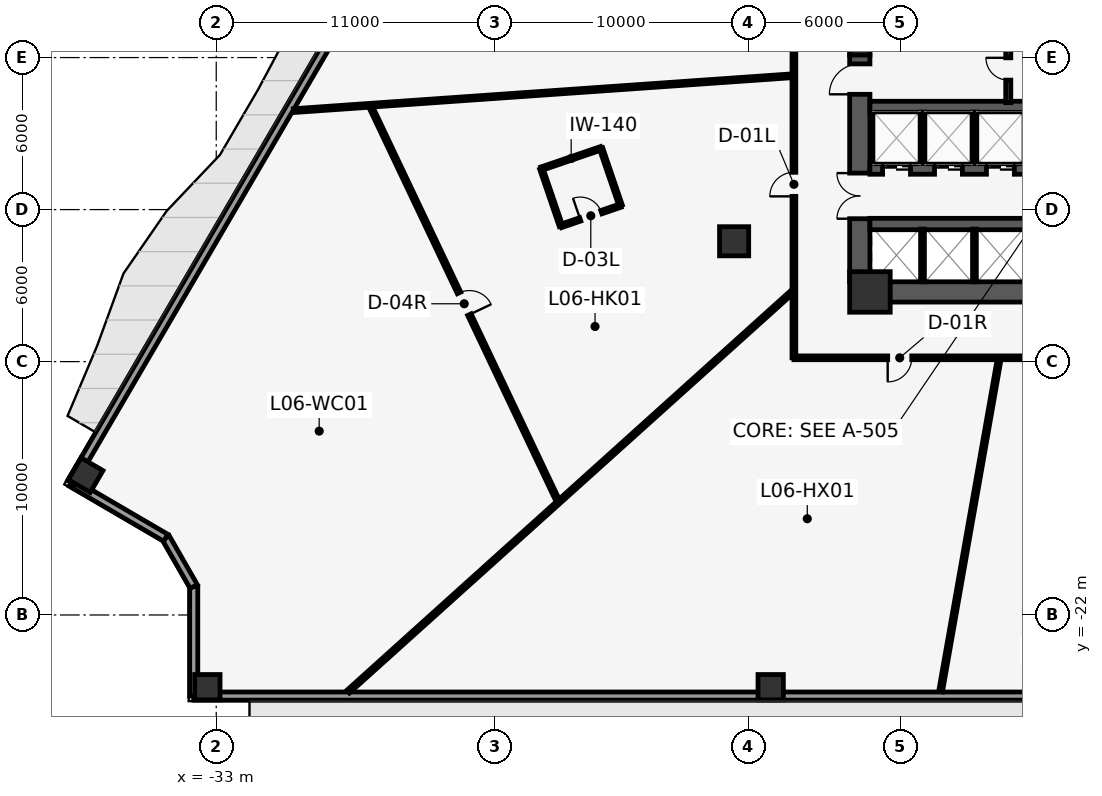
"""IFC4 building model, lengths in metres.
Left out: names, types, materials, properties, quantities, classifications, styles, units other than length and angle.
Written with IfcOpenShell. Run it as: python <this file> out.ifc"""

import sys

from ifc_helpers import new_model, si_unit, direction, frame, frame_2d, origin, origin_2d, place, context, subcontext, project, spatial, rectangle, hollow_rectangle, extrude, element, fill, save


model = new_model("IFC4")
c1 = context("Model", 3, precision=1e-05, world=origin(), true_north=direction((0.0, 1.0)))
c2 = subcontext(c1, "Body", "Model", "MODEL_VIEW")
j1 = project(units=[si_unit("LENGTHUNIT", "METRE"), si_unit("PLANEANGLEUNIT", "RADIAN")], contexts=[c1])
p1 = place(None, origin())
s1 = spatial("IfcSite", under=j1, at=p1, CompositionType="ELEMENT")
p2 = place(p1, origin())
s2 = spatial("IfcBuilding", under=s1, at=p2, CompositionType="ELEMENT")
p3 = place(p2, frame((0.0, 0.0, 34.4)))
s3 = spatial("IfcBuildingStorey", under=s2, at=p3, CompositionType="ELEMENT", Elevation=34.4)
p4 = place(p3, frame((-7.6, 0.1, 0.0), z_axis=(0.0, 0.0, 1.0), x_axis=(0.0, 1.0, 0.0)))
e1 = element("IfcWall", 1, at=p4, inside=s3, PredefinedType="SHEAR", context=c2, shape_type="SweptSolid", body=[
    extrude(rectangle(XDim=9.05, YDim=0.8, at=frame_2d((4.525, 0.0))), origin(), (0.0, 0.0, 1.0), 3.75),
])
p5 = place(p3, frame((-7.6, -8.85, 0.0), z_axis=(0.0, 0.0, 1.0), x_axis=(0.0, 1.0, 0.0)))
e2 = element("IfcWall", 2, at=p5, inside=s3, PredefinedType="SHEAR", context=c2, shape_type="SweptSolid", body=[
    extrude(rectangle(XDim=8.95, YDim=0.8, at=frame_2d((4.475, 0.0))), origin(), (0.0, 0.0, 1.0), 3.75),
])
p6 = place(p5, frame((2.49, 0.0, 0.0)))
e3 = element("IfcOpeningElement", 3, at=p6, cuts=e2, PredefinedType="OPENING", context=c2, shape_type="SweptSolid", body=[
    extrude(rectangle(XDim=1.8, YDim=2.2, at=frame_2d((0.9, 1.1))), frame((0.0, 0.41, 0.0), z_axis=(0.0, -1.0, 0.0), x_axis=(1.0, 0.0, 0.0)), (0.0, 0.0, 1.0), 0.82),
])
p7 = place(p5, frame((7.4, 0.0, 0.0)))
e4 = element("IfcOpeningElement", 4, at=p7, cuts=e2, PredefinedType="OPENING", context=c2, shape_type="SweptSolid", body=[
    extrude(rectangle(XDim=1.2, YDim=2.15, at=frame_2d((0.6, 1.075))), frame((0.0, 0.41, 0.0), z_axis=(0.0, -1.0, 0.0), x_axis=(1.0, 0.0, 0.0)), (0.0, 0.0, 1.0), 0.82),
])
p8 = place(p3, frame((-7.6, -9.25, 0.0), z_axis=(0.0, 0.0, 1.0), x_axis=(1.0, 0.0, 0.0)))
e5 = element("IfcWall", 5, at=p8, inside=s3, PredefinedType="SHEAR", context=c2, shape_type="SweptSolid", body=[
    extrude(rectangle(XDim=15.2, YDim=0.8, at=frame_2d((7.6, 0.0))), origin(), (0.0, 0.0, 1.0), 3.75),
])
p9 = place(p3, frame((-7.2, -1.95, 0.0), z_axis=(0.0, 0.0, 1.0), x_axis=(1.0, 0.0, 0.0)))
e6 = element("IfcWall", 6, at=p9, inside=s3, PredefinedType="SHEAR", context=c2, shape_type="SweptSolid", body=[
    extrude(rectangle(XDim=14.4, YDim=0.45, at=frame_2d((7.2, 0.0))), origin(), (0.0, 0.0, 1.0), 3.75),
])
p10 = place(p3, frame((-7.2, -4.38, 0.0), z_axis=(0.0, 0.0, 1.0), x_axis=(1.0, 0.0, 0.0)))
e7 = element("IfcWall", 7, at=p10, inside=s3, PredefinedType="SHEAR", context=c2, shape_type="SweptSolid", body=[
    extrude(rectangle(XDim=14.4, YDim=0.45, at=frame_2d((7.2, 0.0))), origin(), (0.0, 0.0, 1.0), 3.75),
])
p11 = place(p10, frame((0.5, 0.0, 0.0)))
e8 = element("IfcOpeningElement", 8, at=p11, cuts=e7, PredefinedType="OPENING", context=c2, shape_type="SweptSolid", body=[
    extrude(rectangle(XDim=1.1, YDim=2.2, at=frame_2d((0.55, 1.1))), frame((0.0, 0.235, 0.0), z_axis=(0.0, -1.0, 0.0), x_axis=(1.0, 0.0, 0.0)), (0.0, 0.0, 1.0), 0.47),
])
p12 = place(p10, frame((2.55, 0.0, 0.0)))
e9 = element("IfcOpeningElement", 9, at=p12, cuts=e7, PredefinedType="OPENING", context=c2, shape_type="SweptSolid", body=[
    extrude(rectangle(XDim=1.1, YDim=2.2, at=frame_2d((0.55, 1.1))), frame((0.0, 0.235, 0.0), z_axis=(0.0, -1.0, 0.0), x_axis=(1.0, 0.0, 0.0)), (0.0, 0.0, 1.0), 0.47),
])
p13 = place(p10, frame((4.6, 0.0, 0.0)))
e10 = element("IfcOpeningElement", 10, at=p13, cuts=e7, PredefinedType="OPENING", context=c2, shape_type="SweptSolid", body=[
    extrude(rectangle(XDim=1.1, YDim=2.2, at=frame_2d((0.55, 1.1))), frame((0.0, 0.235, 0.0), z_axis=(0.0, -1.0, 0.0), x_axis=(1.0, 0.0, 0.0)), (0.0, 0.0, 1.0), 0.47),
])
p14 = place(p10, frame((6.3, 0.0, 0.0)))
e11 = element("IfcOpeningElement", 11, at=p14, cuts=e7, PredefinedType="OPENING", context=c2, shape_type="SweptSolid", body=[
    extrude(rectangle(XDim=1.1, YDim=2.2, at=frame_2d((0.55, 1.1))), frame((0.0, 0.235, 0.0), z_axis=(0.0, -1.0, 0.0), x_axis=(1.0, 0.0, 0.0)), (0.0, 0.0, 1.0), 0.47),
])
p15 = place(p3, frame((-7.2, -6.57, 0.0), z_axis=(0.0, 0.0, 1.0), x_axis=(1.0, 0.0, 0.0)))
e12 = element("IfcWall", 12, at=p15, inside=s3, PredefinedType="SHEAR", context=c2, shape_type="SweptSolid", body=[
    extrude(rectangle(XDim=14.4, YDim=0.45, at=frame_2d((7.2, 0.0))), origin(), (0.0, 0.0, 1.0), 3.75),
])
p16 = place(p15, frame((12.91, 0.0, 0.0)))
e13 = element("IfcOpeningElement", 13, at=p16, cuts=e12, PredefinedType="OPENING", context=c2, shape_type="SweptSolid", body=[
    extrude(rectangle(XDim=0.88, YDim=2.15, at=frame_2d((0.44, 1.075))), frame((0.0, 0.235, 0.0), z_axis=(0.0, -1.0, 0.0), x_axis=(1.0, 0.0, 0.0)), (0.0, 0.0, 1.0), 0.47),
])
p17 = place(p3, frame((-7.2, -9.25, 0.0), z_axis=(0.0, 0.0, 1.0), x_axis=(1.0, 0.0, 0.0)))
e14 = element("IfcColumn", 14, at=p17, inside=s3, PredefinedType="COLUMN", context=c2, shape_type="SweptSolid", body=[
    extrude(rectangle(XDim=1.6, YDim=1.6, at=origin_2d()), origin(), (0.0, 0.0, 1.0), 4.0),
])
p18 = place(p3, frame((-12.56, -7.25, 0.0), z_axis=(0.0, 0.0, 1.0), x_axis=(1.0, 0.0, 0.0)))
e15 = element("IfcColumn", 15, at=p18, inside=s3, PredefinedType="COLUMN", context=c2, shape_type="SweptSolid", body=[
    extrude(rectangle(XDim=1.15, YDim=1.15, at=origin_2d()), origin(), (0.0, 0.0, 1.0), 4.0),
])
for number, where, z_axis, x_axis in (
    (16, (-38.154, -16.481, 0.0), (0.0, 0.0, 1.0), (0.504, 0.863, 0.0)),
    (17, (-33.35, -24.85, 0.0), (0.0, 0.0, 1.0), (1.0, 0.0, 0.0)),
    (18, (-11.117, -24.85, 0.0), (0.0, 0.0, 1.0), (1.0, 0.0, 0.0)),
):
    element("IfcColumn", number, at=place(p3, frame(where, z_axis=z_axis, x_axis=x_axis)), inside=s3, PredefinedType="COLUMN", context=c2, shape_type="SweptSolid", body=[
        extrude(hollow_rectangle(XDim=1.0, YDim=1.0, WallThickness=0.06, at=origin_2d()), origin(), (0.0, 0.0, 1.0), 4.0),
    ])
p19 = place(p3, frame((33.888, -25.2, 0.0), z_axis=(0.0, 0.0, 1.0), x_axis=(-1.0, 0.0, 0.0)))
e19 = element("IfcWall", 19, at=p19, inside=s3, PredefinedType="STANDARD", context=c2, shape_type="SweptSolid", body=[
    extrude(rectangle(XDim=67.776, YDim=0.32, at=frame_2d((33.888, 0.0))), origin(), (0.0, 0.0, 1.0), 3.75),
])
p20 = place(p19, frame((33.388, 0.0, 0.0)))
e20 = element("IfcOpeningElement", 20, at=p20, cuts=e19, PredefinedType="OPENING", context=c2, shape_type="SweptSolid", body=[
    extrude(rectangle(XDim=1.0, YDim=2.15, at=frame_2d((0.5, 1.075))), frame((0.0, 0.17, 0.0), z_axis=(0.0, -1.0, 0.0), x_axis=(1.0, 0.0, 0.0)), (0.0, 0.0, 1.0), 0.34),
])
p21 = place(p3, frame((-33.888, -25.2, 0.0), z_axis=(0.0, 0.0, 1.0), x_axis=(0.0, 1.0, 0.0)))
e21 = element("IfcWall", 21, at=p21, inside=s3, PredefinedType="STANDARD", context=c2, shape_type="SweptSolid", body=[
    extrude(rectangle(XDim=4.324, YDim=0.32, at=frame_2d((2.162, 0.0))), origin(), (0.0, 0.0, 1.0), 3.75),
])
p22 = place(p3, frame((-33.888, -20.876, 0.0), z_axis=(0.0, 0.0, 1.0), x_axis=(-0.497881323344, 0.867245171717, 0.0)))
e22 = element("IfcWall", 22, at=p22, inside=s3, PredefinedType="STANDARD", context=c2, shape_type="SweptSolid", body=[
    extrude(rectangle(XDim=2.217, YDim=0.32, at=frame_2d((1.108, 0.0))), origin(), (0.0, 0.0, 1.0), 3.75),
])
p23 = place(p3, frame((-34.992, -18.954, 0.0), z_axis=(0.0, 0.0, 1.0), x_axis=(-0.863569936823, 0.504229079105, 0.0)))
e23 = element("IfcWall", 23, at=p23, inside=s3, PredefinedType="STANDARD", context=c2, shape_type="SweptSolid", body=[
    extrude(rectangle(XDim=4.324, YDim=0.32, at=frame_2d((2.162, 0.0))), origin(), (0.0, 0.0, 1.0), 3.75),
])
p24 = place(p3, frame((-38.726, -16.773, 0.0), z_axis=(0.0, 0.0, 1.0), x_axis=(0.504213113214, 0.863579258935, 0.0)))
e24 = element("IfcWall", 24, at=p24, inside=s3, PredefinedType="STANDARD", context=c2, shape_type="SweptSolid", body=[
    extrude(rectangle(XDim=67.041, YDim=0.32, at=frame_2d((33.521, 0.0))), origin(), (0.0, 0.0, 1.0), 3.75),
])
p25 = place(p24, frame((33.021, 0.0, 0.0)))
e25 = element("IfcOpeningElement", 25, at=p25, cuts=e24, PredefinedType="OPENING", context=c2, shape_type="SweptSolid", body=[
    extrude(rectangle(XDim=1.0, YDim=2.15, at=frame_2d((0.5, 1.075))), frame((0.0, 0.17, 0.0), z_axis=(0.0, -1.0, 0.0), x_axis=(1.0, 0.0, 0.0)), (0.0, 0.0, 1.0), 0.34),
])
for number, where, z_axis, x_axis in (
    (26, (-5.125, -4.18, 0.0), (0.0, 0.0, 1.0), (0.0, 1.0, 0.0)),
    (27, (-3.075, -4.18, 0.0), (0.0, 0.0, 1.0), (0.0, 1.0, 0.0)),
):
    element("IfcWall", number, at=place(p3, frame(where, z_axis=z_axis, x_axis=x_axis)), inside=s3, PredefinedType="PARTITIONING", context=c2, shape_type="SweptSolid", body=[
        extrude(rectangle(XDim=2.03, YDim=0.15, at=frame_2d((1.015, 0.0))), origin(), (0.0, 0.0, 1.0), 3.75),
    ])
for number, where, z_axis, x_axis in (
    (28, (-5.125, -8.85, 0.0), (0.0, 0.0, 1.0), (0.0, 1.0, 0.0)),
    (29, (-3.075, -8.85, 0.0), (0.0, 0.0, 1.0), (0.0, 1.0, 0.0)),
):
    element("IfcWall", number, at=place(p3, frame(where, z_axis=z_axis, x_axis=x_axis)), inside=s3, PredefinedType="PARTITIONING", context=c2, shape_type="SweptSolid", body=[
        extrude(rectangle(XDim=2.08, YDim=0.15, at=frame_2d((1.04, 0.0))), origin(), (0.0, 0.0, 1.0), 3.75),
    ])
p26 = place(p3, frame((-1.74, -1.78, 0.0), z_axis=(0.0, 0.0, 1.0), x_axis=(0.0, 1.0, 0.0)))
e30 = element("IfcWall", 30, at=p26, inside=s3, PredefinedType="PARTITIONING", context=c2, shape_type="SweptSolid", body=[
    extrude(rectangle(XDim=2.98, YDim=0.2, at=frame_2d((1.49, 0.0))), origin(), (0.0, 0.0, 1.0), 3.75),
])
p27 = place(p26, frame((0.89, 0.0, 0.0)))
e31 = element("IfcOpeningElement", 31, at=p27, cuts=e30, PredefinedType="OPENING", context=c2, shape_type="SweptSolid", body=[
    extrude(rectangle(XDim=0.88, YDim=2.15, at=frame_2d((0.44, 1.075))), frame((0.0, 0.11, 0.0), z_axis=(0.0, -1.0, 0.0), x_axis=(1.0, 0.0, 0.0)), (0.0, 0.0, 1.0), 0.22),
])
p28 = place(p3, frame((10.2, -11.85, 0.0), z_axis=(0.0, 0.0, 1.0), x_axis=(-1.0, 0.0, 0.0)))
e32 = element("IfcWall", 32, at=p28, inside=s3, PredefinedType="PARTITIONING", context=c2, shape_type="SweptSolid", body=[
    extrude(rectangle(XDim=20.4, YDim=0.15, at=frame_2d((10.2, 0.0))), origin(), (0.0, 0.0, 1.0), 3.75),
])
p29 = place(p28, frame((15.749, 0.0, 0.0)))
e33 = element("IfcOpeningElement", 33, at=p29, cuts=e32, PredefinedType="OPENING", context=c2, shape_type="SweptSolid", body=[
    extrude(rectangle(XDim=0.95, YDim=2.15, at=frame_2d((0.475, 1.075))), frame((0.0, 0.085, 0.0), z_axis=(0.0, -1.0, 0.0), x_axis=(1.0, 0.0, 0.0)), (0.0, 0.0, 1.0), 0.17),
])
p30 = place(p28, frame((7.604, 0.0, 0.0)))
e34 = element("IfcOpeningElement", 34, at=p30, cuts=e32, PredefinedType="OPENING", context=c2, shape_type="SweptSolid", body=[
    extrude(rectangle(XDim=0.95, YDim=2.15, at=frame_2d((0.475, 1.075))), frame((0.0, 0.085, 0.0), z_axis=(0.0, -1.0, 0.0), x_axis=(1.0, 0.0, 0.0)), (0.0, 0.0, 1.0), 0.17),
])
p31 = place(p3, frame((-10.2, -11.85, 0.0), z_axis=(0.0, 0.0, 1.0), x_axis=(0.0, 1.0, 0.0)))
e35 = element("IfcWall", 35, at=p31, inside=s3, PredefinedType="PARTITIONING", context=c2, shape_type="SweptSolid", body=[
    extrude(rectangle(XDim=24.0, YDim=0.15, at=frame_2d((12.0, 0.0))), origin(), (0.0, 0.0, 1.0), 3.75),
])
p32 = place(p31, frame((6.372, 0.0, 0.0)))
e36 = element("IfcOpeningElement", 36, at=p32, cuts=e35, PredefinedType="OPENING", context=c2, shape_type="SweptSolid", body=[
    extrude(rectangle(XDim=0.95, YDim=2.15, at=frame_2d((0.475, 1.075))), frame((0.0, 0.085, 0.0), z_axis=(0.0, -1.0, 0.0), x_axis=(1.0, 0.0, 0.0)), (0.0, 0.0, 1.0), 0.17),
])
p33 = place(p31, frame((14.489, 0.0, 0.0)))
e37 = element("IfcOpeningElement", 37, at=p33, cuts=e35, PredefinedType="OPENING", context=c2, shape_type="SweptSolid", body=[
    extrude(rectangle(XDim=0.95, YDim=2.15, at=frame_2d((0.475, 1.075))), frame((0.0, 0.085, 0.0), z_axis=(0.0, -1.0, 0.0), x_axis=(1.0, 0.0, 0.0)), (0.0, 0.0, 1.0), 0.17),
])
p34 = place(p3, frame((-10.305, -0.721, 0.0), z_axis=(0.0, 0.0, 1.0), x_axis=(-0.997564481565, -0.069750305525, 0.0)))
e38 = element("IfcWall", 38, at=p34, inside=s3, PredefinedType="PARTITIONING", context=c2, shape_type="SweptSolid", body=[
    extrude(rectangle(XDim=19.696, YDim=0.15, at=frame_2d((9.848, 0.0))), origin(), (0.0, 0.0, 1.0), 3.75),
])
p35 = place(p3, frame((-10.305, -9.279, 0.0), z_axis=(0.0, 0.0, 1.0), x_axis=(-0.743153814776, -0.669120622596, 0.0)))
e39 = element("IfcWall", 39, at=p35, inside=s3, PredefinedType="PARTITIONING", context=c2, shape_type="SweptSolid", body=[
    extrude(rectangle(XDim=23.532, YDim=0.15, at=frame_2d((11.766, 0.0))), origin(), (0.0, 0.0, 1.0), 3.75),
])
p36 = place(p3, frame((-2.108, -11.955, 0.0), z_axis=(0.0, 0.0, 1.0), x_axis=(-0.173657301911, -0.984806144118, 0.0)))
e40 = element("IfcWall", 40, at=p36, inside=s3, PredefinedType="PARTITIONING", context=c2, shape_type="SweptSolid", body=[
    extrude(rectangle(XDim=13.271, YDim=0.15, at=frame_2d((6.636, 0.0))), origin(), (0.0, 0.0, 1.0), 3.75),
])
p37 = place(p3, frame((-26.922, -1.908, 0.0), z_axis=(0.0, 0.0, 1.0), x_axis=(0.429066894507, -0.903272716314, 0.0)))
e41 = element("IfcWall", 41, at=p37, inside=s3, PredefinedType="PARTITIONING", context=c2, shape_type="SweptSolid", body=[
    extrude(rectangle(XDim=17.292, YDim=0.15, at=frame_2d((8.646, 0.0))), origin(), (0.0, 0.0, 1.0), 3.75),
])
p38 = place(p37, frame((8.171, 0.0, 0.0)))
e42 = element("IfcOpeningElement", 42, at=p38, cuts=e41, PredefinedType="OPENING", context=c2, shape_type="SweptSolid", body=[
    extrude(rectangle(XDim=0.95, YDim=2.15, at=frame_2d((0.475, 1.075))), frame((0.0, 0.085, 0.0), z_axis=(0.0, -1.0, 0.0), x_axis=(1.0, 0.0, 0.0)), (0.0, 0.0, 1.0), 0.17),
])
p39 = place(p3, frame((-17.813, -3.579, 0.0), z_axis=(0.0, 0.0, 1.0), x_axis=(-0.946073071665, -0.323953303843, 0.0)))
e43 = element("IfcWall", 43, at=p39, inside=s3, PredefinedType="PARTITIONING", context=c2, shape_type="SweptSolid", body=[
    extrude(rectangle(XDim=2.49, YDim=0.14, at=frame_2d((1.245, 0.0))), origin(), (0.0, 0.0, 1.0), 3.75),
])
p40 = place(p3, frame((-20.169, -4.386, 0.0), z_axis=(0.0, 0.0, 1.0), x_axis=(0.323909063217, -0.946088219336, 0.0)))
e44 = element("IfcWall", 44, at=p40, inside=s3, PredefinedType="PARTITIONING", context=c2, shape_type="SweptSolid", body=[
    extrude(rectangle(XDim=2.39, YDim=0.14, at=frame_2d((1.195, 0.0))), origin(), (0.0, 0.0, 1.0), 3.75),
])
p41 = place(p3, frame((-19.395, -6.647, 0.0), z_axis=(0.0, 0.0, 1.0), x_axis=(0.946073071665, 0.323953303843, 0.0)))
e45 = element("IfcWall", 45, at=p41, inside=s3, PredefinedType="PARTITIONING", context=c2, shape_type="SweptSolid", body=[
    extrude(rectangle(XDim=2.49, YDim=0.14, at=frame_2d((1.245, 0.0))), origin(), (0.0, 0.0, 1.0), 3.75),
])
p42 = place(p41, frame((0.805, 0.0, 0.0)))
e46 = element("IfcOpeningElement", 46, at=p42, cuts=e45, PredefinedType="OPENING", context=c2, shape_type="SweptSolid", body=[
    extrude(rectangle(XDim=0.88, YDim=2.1, at=frame_2d((0.44, 1.05))), frame((0.0, 0.08, 0.0), z_axis=(0.0, -1.0, 0.0), x_axis=(1.0, 0.0, 0.0)), (0.0, 0.0, 1.0), 0.16),
])
p43 = place(p3, frame((-17.039, -5.841, 0.0), z_axis=(0.0, 0.0, 1.0), x_axis=(-0.323909063217, 0.946088219336, 0.0)))
e47 = element("IfcWall", 47, at=p43, inside=s3, PredefinedType="PARTITIONING", context=c2, shape_type="SweptSolid", body=[
    extrude(rectangle(XDim=2.39, YDim=0.14, at=frame_2d((1.195, 0.0))), origin(), (0.0, 0.0, 1.0), 3.75),
])
p44 = place(p11, origin())
e48 = element("IfcDoor", 48, at=p44, inside=s3, OperationType="DOUBLE_DOOR_SLIDING", PredefinedType="DOOR", context=c2, shape_type="SweptSolid", body=[
    extrude(rectangle(XDim=1.1, YDim=2.2, at=frame_2d((0.55, 1.1))), frame((0.0, 0.025, 0.0), z_axis=(0.0, -1.0, 0.0), x_axis=(1.0, 0.0, 0.0)), (0.0, 0.0, 1.0), 0.05),
])
fill(e8, e48)
p45 = place(p12, origin())
e49 = element("IfcDoor", 49, at=p45, inside=s3, OperationType="DOUBLE_DOOR_SLIDING", PredefinedType="DOOR", context=c2, shape_type="SweptSolid", body=[
    extrude(rectangle(XDim=1.1, YDim=2.2, at=frame_2d((0.55, 1.1))), frame((0.0, 0.025, 0.0), z_axis=(0.0, -1.0, 0.0), x_axis=(1.0, 0.0, 0.0)), (0.0, 0.0, 1.0), 0.05),
])
fill(e9, e49)
p46 = place(p13, origin())
e50 = element("IfcDoor", 50, at=p46, inside=s3, OperationType="DOUBLE_DOOR_SLIDING", PredefinedType="DOOR", context=c2, shape_type="SweptSolid", body=[
    extrude(rectangle(XDim=1.1, YDim=2.2, at=frame_2d((0.55, 1.1))), frame((0.0, 0.025, 0.0), z_axis=(0.0, -1.0, 0.0), x_axis=(1.0, 0.0, 0.0)), (0.0, 0.0, 1.0), 0.05),
])
fill(e10, e50)
p47 = place(p6, origin())
e51 = element("IfcDoor", 51, at=p47, inside=s3, OperationType="DOUBLE_DOOR_SINGLE_SWING", PredefinedType="DOOR", context=c2, shape_type="SweptSolid", body=[
    extrude(rectangle(XDim=1.8, YDim=2.2, at=frame_2d((0.9, 1.1))), frame((0.0, 0.025, 0.0), z_axis=(0.0, -1.0, 0.0), x_axis=(1.0, 0.0, 0.0)), (0.0, 0.0, 1.0), 0.05),
])
fill(e3, e51)
p48 = place(p7, origin())
e52 = element("IfcDoor", 52, at=p48, inside=s3, OperationType="SINGLE_SWING_LEFT", PredefinedType="DOOR", context=c2, shape_type="SweptSolid", body=[
    extrude(rectangle(XDim=1.2, YDim=2.15, at=frame_2d((0.6, 1.075))), frame((0.0, 0.025, 0.0), z_axis=(0.0, -1.0, 0.0), x_axis=(1.0, 0.0, 0.0)), (0.0, 0.0, 1.0), 0.05),
])
fill(e4, e52)
p49 = place(p27, origin())
e53 = element("IfcDoor", 53, at=p49, inside=s3, OperationType="SINGLE_SWING_RIGHT", PredefinedType="DOOR", context=c2, shape_type="SweptSolid", body=[
    extrude(rectangle(XDim=0.88, YDim=2.15, at=frame_2d((0.44, 1.075))), frame((0.0, 0.025, 0.0), z_axis=(0.0, -1.0, 0.0), x_axis=(1.0, 0.0, 0.0)), (0.0, 0.0, 1.0), 0.05),
])
fill(e31, e53)
p50 = place(p38, origin())
e54 = element("IfcDoor", 54, at=p50, inside=s3, OperationType="SINGLE_SWING_RIGHT", PredefinedType="DOOR", context=c2, shape_type="SweptSolid", body=[
    extrude(rectangle(XDim=0.95, YDim=2.15, at=frame_2d((0.475, 1.075))), frame((0.0, 0.025, 0.0), z_axis=(0.0, -1.0, 0.0), x_axis=(1.0, 0.0, 0.0)), (0.0, 0.0, 1.0), 0.05),
])
fill(e42, e54)
p51 = place(p42, origin())
e55 = element("IfcDoor", 55, at=p51, inside=s3, OperationType="SINGLE_SWING_LEFT", PredefinedType="DOOR", context=c2, shape_type="SweptSolid", body=[
    extrude(rectangle(XDim=0.88, YDim=2.1, at=frame_2d((0.44, 1.05))), frame((0.0, 0.025, 0.0), z_axis=(0.0, -1.0, 0.0), x_axis=(1.0, 0.0, 0.0)), (0.0, 0.0, 1.0), 0.05),
])
fill(e46, e55)
p52 = place(p32, origin())
e56 = element("IfcDoor", 56, at=p52, inside=s3, OperationType="SINGLE_SWING_LEFT", PredefinedType="DOOR", context=c2, shape_type="SweptSolid", body=[
    extrude(rectangle(XDim=0.95, YDim=2.15, at=frame_2d((0.475, 1.075))), frame((0.0, 0.025, 0.0), z_axis=(0.0, -1.0, 0.0), x_axis=(1.0, 0.0, 0.0)), (0.0, 0.0, 1.0), 0.05),
])
fill(e36, e56)
p53 = place(p29, origin())
e57 = element("IfcDoor", 57, at=p53, inside=s3, OperationType="SINGLE_SWING_RIGHT", PredefinedType="DOOR", context=c2, shape_type="SweptSolid", body=[
    extrude(rectangle(XDim=0.95, YDim=2.15, at=frame_2d((0.475, 1.075))), frame((0.0, 0.025, 0.0), z_axis=(0.0, -1.0, 0.0), x_axis=(1.0, 0.0, 0.0)), (0.0, 0.0, 1.0), 0.05),
])
fill(e33, e57)
save(model, sys.argv[1])
